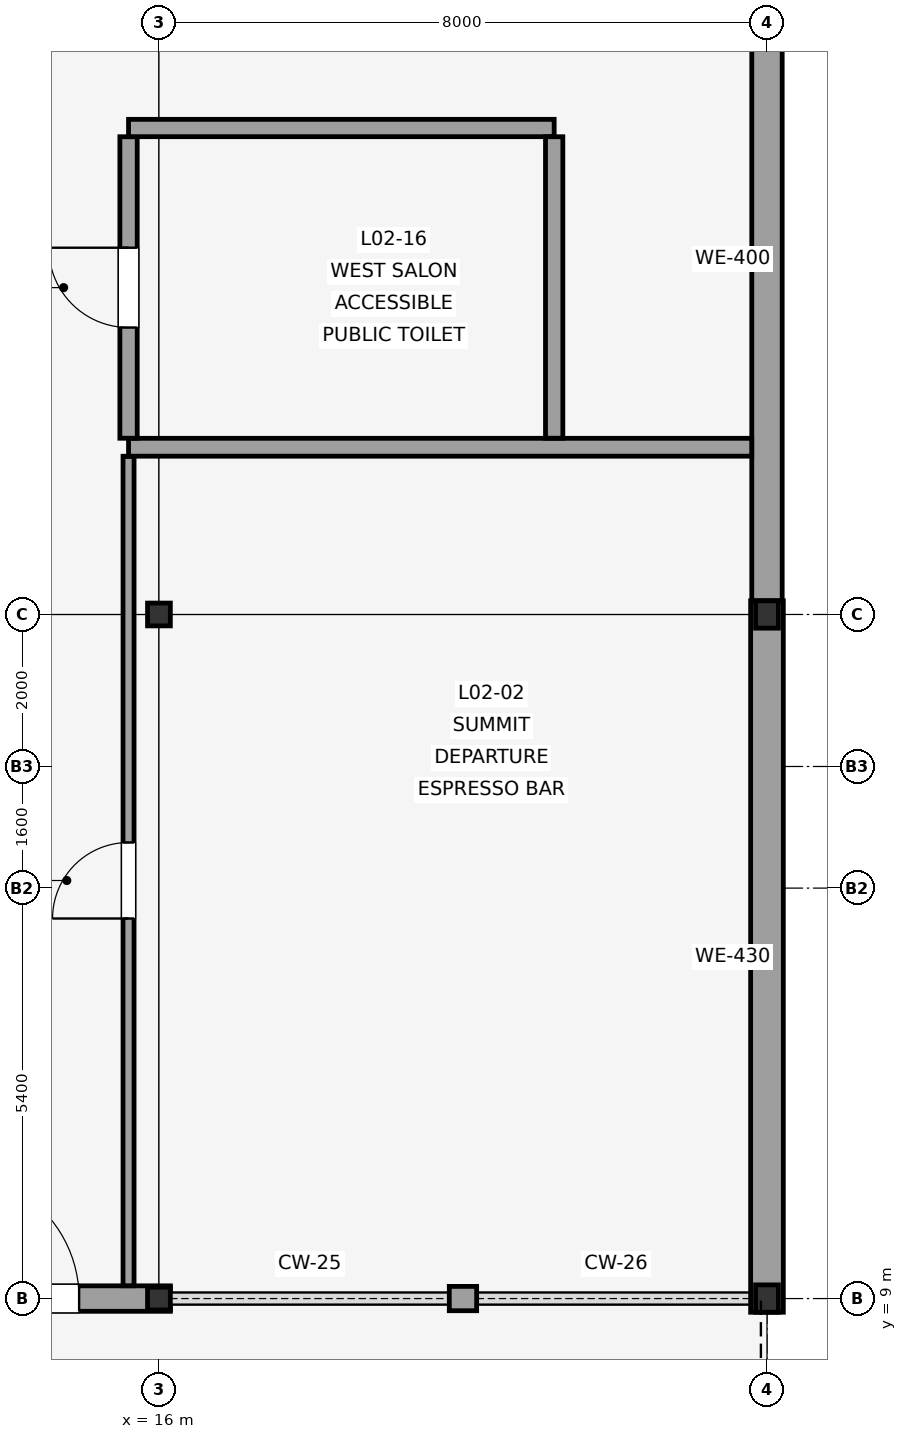
"""IFC4 building model, lengths in metres.
Left out: names, types, materials, properties, quantities, classifications, styles, units other than length and angle.
Written with IfcOpenShell. Run it as: python <this file> out.ifc"""

import sys

from ifc_helpers import new_model, si_unit, direction, frame, frame_2d, origin, origin_2d, place, context, subcontext, project, spatial, rectangle, i_section, extrude, element, fill, save


model = new_model("IFC4")
c1 = context("Model", 3, precision=1e-05, world=origin(), true_north=direction((0.0, 1.0)))
c2 = subcontext(c1, "Body", "Model", "MODEL_VIEW")
j1 = project(units=[si_unit("LENGTHUNIT", "METRE"), si_unit("PLANEANGLEUNIT", "RADIAN")], contexts=[c1])
p1 = place(None, origin())
s1 = spatial("IfcSite", under=j1, at=p1, CompositionType="ELEMENT")
p2 = place(p1, origin())
s2 = spatial("IfcBuilding", under=s1, at=p2, CompositionType="ELEMENT")
p3 = place(p2, frame((0.0, 0.0, 9.0)))
s3 = spatial("IfcBuildingStorey", under=s2, at=p3, CompositionType="ELEMENT", Elevation=9.0)
for number, where, z_axis, x_axis in (
    (1, (16.0, 9.0, 0.0), (0.0, 0.0, 1.0), (1.0, 0.0, 0.0)),
    (2, (16.0, 18.0, 0.0), (0.0, 0.0, 1.0), (1.0, 0.0, 0.0)),
):
    element("IfcColumn", number, at=place(p3, frame(where, z_axis=z_axis, x_axis=x_axis)), inside=s3, PredefinedType="COLUMN", context=c2, shape_type="SweptSolid", body=[
        extrude(i_section(OverallWidth=0.3, OverallDepth=0.3, WebThickness=0.011, FlangeThickness=0.019, FilletRadius=0.027, at=origin_2d()), origin(), (0.0, 0.0, 1.0), 4.8),
    ])
for number, where, z_axis, x_axis in (
    (3, (24.0, 9.0, 0.0), (0.0, 0.0, 1.0), (1.0, 0.0, 0.0)),
    (4, (24.0, 18.0, 0.0), (0.0, 0.0, 1.0), (1.0, 0.0, 0.0)),
):
    element("IfcColumn", number, at=place(p3, frame(where, z_axis=z_axis, x_axis=x_axis)), inside=s3, PredefinedType="COLUMN", context=c2, shape_type="SweptSolid", body=[
        extrude(i_section(OverallWidth=0.3, OverallDepth=0.36, WebThickness=0.012, FlangeThickness=0.022, FilletRadius=0.027, at=origin_2d()), origin(), (0.0, 0.0, 1.0), 4.8),
    ])
p4 = place(p3, frame((7.85, 9.0, 0.0), z_axis=(0.0, 0.0, 1.0), x_axis=(1.0, 0.0, 0.0)))
e5 = element("IfcWall", 5, at=p4, inside=s3, PredefinedType="SOLIDWALL", context=c2, shape_type="SweptSolid", body=[
    extrude(rectangle(XDim=8.3, YDim=0.335, at=frame_2d((4.15, 0.0))), origin(), (0.0, 0.0, 1.0), 3.42),
])
p5 = place(p4, frame((5.45, 0.0, 0.0)))
e6 = element("IfcOpeningElement", 6, at=p5, cuts=e5, PredefinedType="OPENING", context=c2, shape_type="SweptSolid", body=[
    extrude(rectangle(XDim=1.65, YDim=2.3, at=frame_2d((0.825, 1.15))), frame((0.0, 0.177, 0.0), z_axis=(0.0, -1.0, 0.0), x_axis=(1.0, 0.0, 0.0)), (0.0, 0.0, 1.0), 0.355),
])
p6 = place(p3, frame((19.82, 9.0, 0.0), z_axis=(0.0, 0.0, 1.0), x_axis=(1.0, 0.0, 0.0)))
e7 = element("IfcWall", 7, at=p6, inside=s3, PredefinedType="SOLIDWALL", context=c2, shape_type="SweptSolid", body=[
    extrude(rectangle(XDim=0.36, YDim=0.32, at=frame_2d((0.18, 0.0))), origin(), (0.0, 0.0, 1.0), 3.42),
])
p7 = place(p3, frame((24.0, 8.82, 0.0), z_axis=(0.0, 0.0, 1.0), x_axis=(0.0, 1.0, 0.0)))
e8 = element("IfcWall", 8, at=p7, inside=s3, PredefinedType="SOLIDWALL", context=c2, shape_type="SweptSolid", body=[
    extrude(rectangle(XDim=9.36, YDim=0.43, at=frame_2d((4.68, 0.0))), origin(), (0.0, 0.0, 1.0), 3.42),
])
p8 = place(p3, frame((24.0, 18.181, 0.0), z_axis=(0.0, 0.0, 1.0), x_axis=(0.0, 1.0, 0.0)))
e9 = element("IfcWall", 9, at=p8, inside=s3, PredefinedType="SOLIDWALL", context=c2, shape_type="SweptSolid", body=[
    extrude(rectangle(XDim=8.999, YDim=0.4, at=frame_2d((4.5, 0.0))), origin(), (0.0, 0.0, 1.0), 3.42),
])
p9 = place(p3, frame((15.6, 9.168, 0.0), z_axis=(0.0, 0.0, 1.0), x_axis=(0.0, 1.0, 0.0)))
e10 = element("IfcWall", 10, at=p9, inside=s3, PredefinedType="PARTITIONING", context=c2, shape_type="SweptSolid", body=[
    extrude(rectangle(XDim=10.913, YDim=0.145, at=frame_2d((5.457, 0.0))), origin(), (0.0, 0.0, 1.0), 2.7),
])
p10 = place(p9, frame((4.832, 0.0, 0.0)))
e11 = element("IfcOpeningElement", 11, at=p10, cuts=e10, PredefinedType="OPENING", context=c2, shape_type="SweptSolid", body=[
    extrude(rectangle(XDim=1.0, YDim=2.15, at=frame_2d((0.5, 1.075))), frame((0.0, 0.083, 0.0), z_axis=(0.0, -1.0, 0.0), x_axis=(1.0, 0.0, 0.0)), (0.0, 0.0, 1.0), 0.165),
])
p11 = place(p3, frame((15.6, 20.2, 0.0), z_axis=(0.0, 0.0, 1.0), x_axis=(1.0, 0.0, 0.0)))
e12 = element("IfcWall", 12, at=p11, inside=s3, PredefinedType="PARTITIONING", context=c2, shape_type="SweptSolid", body=[
    extrude(rectangle(XDim=8.199, YDim=0.235, at=frame_2d((4.1, 0.0))), origin(), (0.0, 0.0, 1.0), 2.7),
])
p12 = place(p3, frame((15.6, 20.319, 0.0), z_axis=(0.0, 0.0, 1.0), x_axis=(0.0, 1.0, 0.0)))
e13 = element("IfcWall", 13, at=p12, inside=s3, PredefinedType="PLUMBINGWALL", context=c2, shape_type="SweptSolid", body=[
    extrude(rectangle(XDim=3.966, YDim=0.228, at=frame_2d((1.983, 0.0))), origin(), (0.0, 0.0, 1.0), 2.7),
])
p13 = place(p12, frame((1.457, 0.0, 0.0)))
e14 = element("IfcOpeningElement", 14, at=p13, cuts=e13, PredefinedType="OPENING", context=c2, shape_type="SweptSolid", body=[
    extrude(rectangle(XDim=1.05, YDim=2.15, at=frame_2d((0.525, 1.075))), frame((0.0, 0.124, 0.0), z_axis=(0.0, -1.0, 0.0), x_axis=(1.0, 0.0, 0.0)), (0.0, 0.0, 1.0), 0.248),
])
p14 = place(p3, frame((15.6, 24.4, 0.0), z_axis=(0.0, 0.0, 1.0), x_axis=(1.0, 0.0, 0.0)))
e15 = element("IfcWall", 15, at=p14, inside=s3, PredefinedType="PLUMBINGWALL", context=c2, shape_type="SweptSolid", body=[
    extrude(rectangle(XDim=5.6, YDim=0.228, at=frame_2d((2.8, 0.0))), origin(), (0.0, 0.0, 1.0), 2.7),
])
p15 = place(p3, frame((21.2, 24.285, 0.0), z_axis=(0.0, 0.0, 1.0), x_axis=(0.0, -1.0, 0.0)))
e16 = element("IfcWall", 16, at=p15, inside=s3, PredefinedType="PLUMBINGWALL", context=c2, shape_type="SweptSolid", body=[
    extrude(rectangle(XDim=3.966, YDim=0.228, at=frame_2d((1.983, 0.0))), origin(), (0.0, 0.0, 1.0), 2.7),
])
p16 = place(p5, origin())
e17 = element("IfcDoor", 17, at=p16, inside=s3, OperationType="DOUBLE_SWING_LEFT", PredefinedType="DOOR", context=c2, shape_type="SweptSolid", body=[
    extrude(rectangle(XDim=1.65, YDim=2.3, at=frame_2d((0.825, 1.15))), frame((0.0, 0.025, 0.0), z_axis=(0.0, -1.0, 0.0), x_axis=(1.0, 0.0, 0.0)), (0.0, 0.0, 1.0), 0.05),
])
fill(e6, e17)
p17 = place(p10, origin())
e18 = element("IfcDoor", 18, at=p17, inside=s3, OperationType="SINGLE_SWING_LEFT", PredefinedType="DOOR", context=c2, shape_type="SweptSolid", body=[
    extrude(rectangle(XDim=1.0, YDim=2.15, at=frame_2d((0.5, 1.075))), frame((0.0, 0.025, 0.0), z_axis=(0.0, -1.0, 0.0), x_axis=(1.0, 0.0, 0.0)), (0.0, 0.0, 1.0), 0.05),
])
fill(e11, e18)
p18 = place(p13, origin())
e19 = element("IfcDoor", 19, at=p18, inside=s3, OperationType="SINGLE_SWING_RIGHT", PredefinedType="DOOR", context=c2, shape_type="SweptSolid", body=[
    extrude(rectangle(XDim=1.05, YDim=2.15, at=frame_2d((0.525, 1.075))), frame((0.0, 0.025, 0.0), z_axis=(0.0, -1.0, 0.0), x_axis=(1.0, 0.0, 0.0)), (0.0, 0.0, 1.0), 0.05),
])
fill(e14, e19)
save(model, sys.argv[1])
